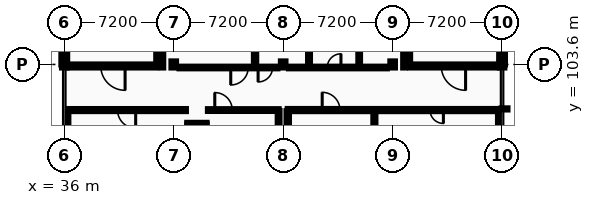
"""IFC4 building model, lengths in metres.
Left out: names, types, materials, properties, quantities, classifications, styles, units other than length and angle.
Written with IfcOpenShell. Run it as: python <this file> out.ifc"""

import sys

from ifc_helpers import new_model, si_unit, direction, frame, frame_2d, origin, origin_2d, place, context, subcontext, project, spatial, rectangle, i_section, extrude, element, fill, save


model = new_model("IFC4")
c1 = context("Model", 3, precision=1e-05, world=origin(), true_north=direction((0.0, 1.0)))
c2 = subcontext(c1, "Body", "Model", "MODEL_VIEW")
j1 = project(units=[si_unit("LENGTHUNIT", "METRE"), si_unit("PLANEANGLEUNIT", "RADIAN")], contexts=[c1])
p1 = place(None, origin())
s1 = spatial("IfcSite", under=j1, at=p1, CompositionType="ELEMENT")
p2 = place(p1, origin())
s2 = spatial("IfcBuilding", under=s1, at=p2, CompositionType="ELEMENT")
p3 = place(p2, frame((0.0, 0.0, 9.6)))
s3 = spatial("IfcBuildingStorey", under=s2, at=p3, CompositionType="ELEMENT", Elevation=9.6)
for number, where, z_axis, x_axis in (
    (1, (36.0, 103.6, 0.0), (0.0, 0.0, 1.0), (1.0, 0.0, 0.0)),
    (2, (43.2, 103.6, 0.0), (0.0, 0.0, 1.0), (1.0, 0.0, 0.0)),
    (3, (50.4, 103.6, 0.0), (0.0, 0.0, 1.0), (1.0, 0.0, 0.0)),
    (4, (57.6, 103.6, 0.0), (0.0, 0.0, 1.0), (1.0, 0.0, 0.0)),
    (5, (64.8, 103.6, 0.0), (0.0, 0.0, 1.0), (1.0, 0.0, 0.0)),
):
    element("IfcColumn", number, at=place(p3, frame(where, z_axis=z_axis, x_axis=x_axis)), inside=s3, PredefinedType="COLUMN", context=c2, shape_type="SweptSolid", body=[
        extrude(i_section(OverallWidth=0.3, OverallDepth=0.4, WebThickness=0.013, FlangeThickness=0.024, FilletRadius=0.027, at=origin_2d()), origin(), (0.0, 0.0, 1.0), 4.4),
    ])
p4 = place(p3, frame((36.0, 106.8, 0.0), z_axis=(0.0, 0.0, 1.0), x_axis=(0.0, -1.0, 0.0)))
e6 = element("IfcWall", 6, at=p4, inside=s3, PredefinedType="STANDARD", context=c2, shape_type="SweptSolid", body=[
    extrude(rectangle(XDim=3.2, YDim=0.38, at=frame_2d((1.6, 0.0))), origin(), (0.0, 0.0, 1.0), 4.2),
])
p5 = place(p4, frame((0.966, 0.0, 0.95)))
e7 = element("IfcOpeningElement", 7, at=p5, cuts=e6, PredefinedType="OPENING", context=c2, shape_type="SweptSolid", body=[
    extrude(rectangle(XDim=1.268, YDim=1.404, at=frame_2d((0.634, 0.702))), frame((0.0, 0.2, 0.0), z_axis=(0.0, -1.0, 0.0), x_axis=(1.0, 0.0, 0.0)), (0.0, 0.0, 1.0), 0.4),
])
p6 = place(p3, frame((64.8, 103.6, 0.0), z_axis=(0.0, 0.0, 1.0), x_axis=(0.0, 1.0, 0.0)))
e8 = element("IfcWall", 8, at=p6, inside=s3, PredefinedType="STANDARD", context=c2, shape_type="SweptSolid", body=[
    extrude(rectangle(XDim=3.2, YDim=0.38, at=frame_2d((1.6, 0.0))), origin(), (0.0, 0.0, 1.0), 4.2),
])
p7 = place(p6, frame((0.7, 0.0, 0.9)))
e9 = element("IfcOpeningElement", 9, at=p7, cuts=e8, PredefinedType="OPENING", context=c2, shape_type="SweptSolid", body=[
    extrude(rectangle(XDim=1.8, YDim=1.8, at=frame_2d((0.9, 0.9))), frame((0.0, 0.2, 0.0), z_axis=(0.0, -1.0, 0.0), x_axis=(1.0, 0.0, 0.0)), (0.0, 0.0, 1.0), 0.4),
])
p8 = place(p3, frame((36.35, 103.5, 0.0), z_axis=(0.0, 0.0, 1.0), x_axis=(1.0, 0.0, 0.0)))
e10 = element("IfcWall", 10, at=p8, inside=s3, PredefinedType="PARTITIONING", context=c2, shape_type="SweptSolid", body=[
    extrude(rectangle(XDim=5.7, YDim=0.2, at=frame_2d((2.85, 0.0))), origin(), (0.0, 0.0, 1.0), 3.895),
])
p9 = place(p8, frame((2.05, 0.0, 0.0)))
e11 = element("IfcOpeningElement", 11, at=p9, cuts=e10, PredefinedType="OPENING", context=c2, shape_type="SweptSolid", body=[
    extrude(rectangle(XDim=1.6, YDim=2.2, at=frame_2d((0.8, 1.1))), frame((0.0, 0.11, 0.0), z_axis=(0.0, -1.0, 0.0), x_axis=(1.0, 0.0, 0.0)), (0.0, 0.0, 1.0), 0.22),
])
p10 = place(p3, frame((42.15, 103.6, 0.0), z_axis=(0.0, 0.0, 1.0), x_axis=(0.0, 1.0, 0.0)))
e12 = element("IfcWall", 12, at=p10, inside=s3, PredefinedType="PARTITIONING", context=c2, shape_type="SweptSolid", body=[
    extrude(rectangle(XDim=3.2, YDim=0.2, at=frame_2d((1.6, 0.0))), origin(), (0.0, 0.0, 1.0), 4.2),
])
p11 = place(p3, frame((58.75, 103.5, 0.0), z_axis=(0.0, 0.0, 1.0), x_axis=(1.0, 0.0, 0.0)))
e13 = element("IfcWall", 13, at=p11, inside=s3, PredefinedType="PARTITIONING", context=c2, shape_type="SweptSolid", body=[
    extrude(rectangle(XDim=5.7, YDim=0.2, at=frame_2d((2.85, 0.0))), origin(), (0.0, 0.0, 1.0), 3.895),
])
p12 = place(p11, frame((2.05, 0.0, 0.0)))
e14 = element("IfcOpeningElement", 14, at=p12, cuts=e13, PredefinedType="OPENING", context=c2, shape_type="SweptSolid", body=[
    extrude(rectangle(XDim=1.6, YDim=2.2, at=frame_2d((0.8, 1.1))), frame((0.0, 0.11, 0.0), z_axis=(0.0, -1.0, 0.0), x_axis=(1.0, 0.0, 0.0)), (0.0, 0.0, 1.0), 0.22),
])
p13 = place(p3, frame((58.65, 103.6, 0.0), z_axis=(0.0, 0.0, 1.0), x_axis=(0.0, 1.0, 0.0)))
e15 = element("IfcWall", 15, at=p13, inside=s3, PredefinedType="PARTITIONING", context=c2, shape_type="SweptSolid", body=[
    extrude(rectangle(XDim=3.2, YDim=0.2, at=frame_2d((1.6, 0.0))), origin(), (0.0, 0.0, 1.0), 4.2),
])
p14 = place(p3, frame((44.09, 99.705, 0.0), z_axis=(0.0, 0.0, 1.0), x_axis=(1.0, 0.0, 0.0)))
e16 = element("IfcWall", 16, at=p14, inside=s3, PredefinedType="PARTITIONING", context=c2, shape_type="SweptSolid", body=[
    extrude(rectangle(XDim=1.27, YDim=0.11, at=frame_2d((0.635, 0.0))), origin(), (0.0, 0.0, 1.0), 4.2),
])
for number, where, z_axis, x_axis in (
    (17, (44.145, 98.6, 0.0), (0.0, 0.0, 1.0), (0.0, 1.0, 0.0)),
    (18, (45.305, 98.6, 0.0), (0.0, 0.0, 1.0), (0.0, 1.0, 0.0)),
):
    element("IfcWall", number, at=place(p3, frame(where, z_axis=z_axis, x_axis=x_axis)), inside=s3, PredefinedType="PARTITIONING", context=c2, shape_type="SweptSolid", body=[
        extrude(rectangle(XDim=1.05, YDim=0.11, at=frame_2d((0.525, 0.0))), origin(), (0.0, 0.0, 1.0), 4.2),
    ])
p15 = place(p3, frame((36.2, 100.6, 0.0), z_axis=(0.0, 0.0, 1.0), x_axis=(1.0, 0.0, 0.0)))
e19 = element("IfcWall", 19, at=p15, inside=s3, PredefinedType="PARTITIONING", context=c2, shape_type="SweptSolid", body=[
    extrude(rectangle(XDim=7.8, YDim=0.135, at=frame_2d((3.9, 0.0))), origin(), (0.0, 0.0, 1.0), 4.2),
])
p16 = place(p15, frame((3.304, 0.0, 0.0)))
e20 = element("IfcOpeningElement", 20, at=p16, cuts=e19, PredefinedType="OPENING", context=c2, shape_type="SweptSolid", body=[
    extrude(rectangle(XDim=1.192, YDim=2.152, at=frame_2d((0.596, 1.076))), frame((0.0, 0.078, 0.0), z_axis=(0.0, -1.0, 0.0), x_axis=(1.0, 0.0, 0.0)), (0.0, 0.0, 1.0), 0.155),
])
p17 = place(p3, frame((45.45, 100.6, 0.0), z_axis=(0.0, 0.0, 1.0), x_axis=(1.0, 0.0, 0.0)))
e21 = element("IfcWall", 21, at=p17, inside=s3, PredefinedType="PARTITIONING", context=c2, shape_type="SweptSolid", body=[
    extrude(rectangle(XDim=4.65, YDim=0.118, at=frame_2d((2.325, 0.0))), origin(), (0.0, 0.0, 1.0), 4.2),
])
p18 = place(p17, frame((0.45, 0.0, 0.0)))
e22 = element("IfcOpeningElement", 22, at=p18, cuts=e21, PredefinedType="OPENING", context=c2, shape_type="SweptSolid", body=[
    extrude(rectangle(XDim=1.15, YDim=2.15, at=frame_2d((0.575, 1.075))), frame((0.0, 0.069, 0.0), z_axis=(0.0, -1.0, 0.0), x_axis=(1.0, 0.0, 0.0)), (0.0, 0.0, 1.0), 0.138),
])
p19 = place(p3, frame((50.7, 100.6, 0.0), z_axis=(0.0, 0.0, 1.0), x_axis=(1.0, 0.0, 0.0)))
e23 = element("IfcWall", 23, at=p19, inside=s3, PredefinedType="PARTITIONING", context=c2, shape_type="SweptSolid", body=[
    extrude(rectangle(XDim=13.9, YDim=0.142, at=frame_2d((6.95, 0.0))), origin(), (0.0, 0.0, 1.0), 4.2),
])
p20 = place(p19, frame((2.267, 0.0, 0.0)))
e24 = element("IfcOpeningElement", 24, at=p20, cuts=e23, PredefinedType="OPENING", context=c2, shape_type="SweptSolid", body=[
    extrude(rectangle(XDim=1.166, YDim=2.152, at=frame_2d((0.583, 1.076))), frame((0.0, 0.081, 0.0), z_axis=(0.0, -1.0, 0.0), x_axis=(1.0, 0.0, 0.0)), (0.0, 0.0, 1.0), 0.162),
])
p21 = place(p19, frame((9.36, 0.0, 0.0)))
e25 = element("IfcOpeningElement", 25, at=p21, cuts=e23, PredefinedType="OPENING", context=c2, shape_type="SweptSolid", body=[
    extrude(rectangle(XDim=0.88, YDim=2.04, at=frame_2d((0.44, 1.02))), frame((0.0, 0.081, 0.0), z_axis=(0.0, -1.0, 0.0), x_axis=(1.0, 0.0, 0.0)), (0.0, 0.0, 1.0), 0.162),
])
p22 = place(p3, frame((43.58, 103.4, 0.0), z_axis=(0.0, 0.0, 1.0), x_axis=(1.0, 0.0, 0.0)))
e26 = element("IfcWall", 26, at=p22, inside=s3, PredefinedType="PARTITIONING", context=c2, shape_type="SweptSolid", body=[
    extrude(rectangle(XDim=6.44, YDim=0.11, at=frame_2d((3.22, 0.0))), origin(), (0.0, 0.0, 1.0), 3.895),
])
p23 = place(p22, frame((5.17, 0.0, 0.0)))
e27 = element("IfcOpeningElement", 27, at=p23, cuts=e26, PredefinedType="OPENING", context=c2, shape_type="SweptSolid", body=[
    extrude(rectangle(XDim=0.95, YDim=2.1, at=frame_2d((0.475, 1.05))), frame((0.0, 0.065, 0.0), z_axis=(0.0, -1.0, 0.0), x_axis=(1.0, 0.0, 0.0)), (0.0, 0.0, 1.0), 0.13),
])
p24 = place(p22, frame((3.37, 0.0, 0.0)))
e28 = element("IfcOpeningElement", 28, at=p24, cuts=e26, PredefinedType="OPENING", context=c2, shape_type="SweptSolid", body=[
    extrude(rectangle(XDim=1.15, YDim=2.15, at=frame_2d((0.575, 1.075))), frame((0.0, 0.065, 0.0), z_axis=(0.0, -1.0, 0.0), x_axis=(1.0, 0.0, 0.0)), (0.0, 0.0, 1.0), 0.13),
])
p25 = place(p3, frame((50.78, 103.4, 0.0), z_axis=(0.0, 0.0, 1.0), x_axis=(1.0, 0.0, 0.0)))
e29 = element("IfcWall", 29, at=p25, inside=s3, PredefinedType="PARTITIONING", context=c2, shape_type="SweptSolid", body=[
    extrude(rectangle(XDim=6.44, YDim=0.11, at=frame_2d((3.22, 0.0))), origin(), (0.0, 0.0, 1.0), 3.895),
])
p26 = place(p25, frame((5.03, 0.0, 0.0)))
e30 = element("IfcOpeningElement", 30, at=p26, cuts=e29, PredefinedType="OPENING", context=c2, shape_type="SweptSolid", body=[
    extrude(rectangle(XDim=1.0, YDim=2.1, at=frame_2d((0.5, 1.05))), frame((0.0, 0.065, 0.0), z_axis=(0.0, -1.0, 0.0), x_axis=(1.0, 0.0, 0.0)), (0.0, 0.0, 1.0), 0.13),
])
p27 = place(p25, frame((2.52, 0.0, 0.0)))
e31 = element("IfcOpeningElement", 31, at=p27, cuts=e29, PredefinedType="OPENING", context=c2, shape_type="SweptSolid", body=[
    extrude(rectangle(XDim=0.9, YDim=2.1, at=frame_2d((0.45, 1.05))), frame((0.0, 0.065, 0.0), z_axis=(0.0, -1.0, 0.0), x_axis=(1.0, 0.0, 0.0)), (0.0, 0.0, 1.0), 0.13),
])
p28 = place(p3, frame((36.2, 96.78, 0.0), z_axis=(0.0, 0.0, 1.0), x_axis=(0.0, 1.0, 0.0)))
e32 = element("IfcWall", 32, at=p28, inside=s3, PredefinedType="PARTITIONING", context=c2, shape_type="SweptSolid", body=[
    extrude(rectangle(XDim=3.752, YDim=0.135, at=frame_2d((1.876, 0.0))), origin(), (0.0, 0.0, 1.0), 3.885),
])
p29 = place(p3, frame((42.45, 103.4, 0.0), z_axis=(0.0, 0.0, 1.0), x_axis=(0.0, 1.0, 0.0)))
e33 = element("IfcWall", 33, at=p29, inside=s3, PredefinedType="PARTITIONING", context=c2, shape_type="SweptSolid", body=[
    extrude(rectangle(XDim=3.225, YDim=0.118, at=frame_2d((1.613, 0.0))), origin(), (0.0, 0.0, 1.0), 4.2),
])
p30 = place(p3, frame((48.55, 103.455, 0.0), z_axis=(0.0, 0.0, 1.0), x_axis=(0.0, 1.0, 0.0)))
e34 = element("IfcWall", 34, at=p30, inside=s3, PredefinedType="PARTITIONING", context=c2, shape_type="SweptSolid", body=[
    extrude(rectangle(XDim=14.345, YDim=0.15, at=frame_2d((7.172, 0.0))), origin(), (0.0, 0.0, 1.0), 4.2),
])
p31 = place(p3, frame((50.1, 96.78, 0.0), z_axis=(0.0, 0.0, 1.0), x_axis=(0.0, 1.0, 0.0)))
e35 = element("IfcWall", 35, at=p31, inside=s3, PredefinedType="PARTITIONING", context=c2, shape_type="SweptSolid", body=[
    extrude(rectangle(XDim=3.761, YDim=0.118, at=frame_2d((1.88, 0.0))), origin(), (0.0, 0.0, 1.0), 4.2),
])
p32 = place(p3, frame((50.7, 96.78, 0.0), z_axis=(0.0, 0.0, 1.0), x_axis=(0.0, 1.0, 0.0)))
e36 = element("IfcWall", 36, at=p32, inside=s3, PredefinedType="PARTITIONING", context=c2, shape_type="SweptSolid", body=[
    extrude(rectangle(XDim=3.749, YDim=0.16, at=frame_2d((1.875, 0.0))), origin(), (0.0, 0.0, 1.0), 3.895),
])
p33 = place(p3, frame((52.1, 103.455, 0.0), z_axis=(0.0, 0.0, 1.0), x_axis=(0.0, 1.0, 0.0)))
e37 = element("IfcWall", 37, at=p33, inside=s3, PredefinedType="PARTITIONING", context=c2, shape_type="SweptSolid", body=[
    extrude(rectangle(XDim=14.345, YDim=0.125, at=frame_2d((7.172, 0.0))), origin(), (0.0, 0.0, 1.0), 4.2),
])
p34 = place(p3, frame((55.4, 103.455, 0.0), z_axis=(0.0, 0.0, 1.0), x_axis=(0.0, 1.0, 0.0)))
e38 = element("IfcWall", 38, at=p34, inside=s3, PredefinedType="PARTITIONING", context=c2, shape_type="SweptSolid", body=[
    extrude(rectangle(XDim=14.345, YDim=0.11, at=frame_2d((7.172, 0.0))), origin(), (0.0, 0.0, 1.0), 3.915),
])
p35 = place(p3, frame((56.4, 82.271, 0.0), z_axis=(0.0, 0.0, 1.0), x_axis=(0.0, 1.0, 0.0)))
e39 = element("IfcWall", 39, at=p35, inside=s3, PredefinedType="PARTITIONING", context=c2, shape_type="SweptSolid", body=[
    extrude(rectangle(XDim=18.258, YDim=0.135, at=frame_2d((9.129, 0.0))), origin(), (0.0, 0.0, 1.0), 4.2),
])
p36 = place(p3, frame((58.35, 103.4, 0.0), z_axis=(0.0, 0.0, 1.0), x_axis=(0.0, 1.0, 0.0)))
e40 = element("IfcWall", 40, at=p36, inside=s3, PredefinedType="PARTITIONING", context=c2, shape_type="SweptSolid", body=[
    extrude(rectangle(XDim=3.225, YDim=0.11, at=frame_2d((1.613, 0.0))), origin(), (0.0, 0.0, 1.0), 4.2),
])
p37 = place(p3, frame((64.6, 96.78, 0.0), z_axis=(0.0, 0.0, 1.0), x_axis=(0.0, 1.0, 0.0)))
e41 = element("IfcWall", 41, at=p37, inside=s3, PredefinedType="PARTITIONING", context=c2, shape_type="SweptSolid", body=[
    extrude(rectangle(XDim=3.749, YDim=0.135, at=frame_2d((1.875, 0.0))), origin(), (0.0, 0.0, 1.0), 3.885),
])
p38 = place(p7, origin())
e42 = element("IfcWindow", 42, at=p38, inside=s3, PartitioningType="SINGLE_PANEL", PredefinedType="WINDOW", context=c2, shape_type="SweptSolid", body=[
    extrude(rectangle(XDim=1.8, YDim=1.8, at=frame_2d((0.9, 0.9))), frame((0.0, 0.03, 0.0), z_axis=(0.0, -1.0, 0.0), x_axis=(1.0, 0.0, 0.0)), (0.0, 0.0, 1.0), 0.06),
])
fill(e9, e42)
p39 = place(p9, origin())
e43 = element("IfcDoor", 43, at=p39, inside=s3, OperationType="DOUBLE_DOOR_SINGLE_SWING", PredefinedType="DOOR", context=c2, shape_type="SweptSolid", body=[
    extrude(rectangle(XDim=1.6, YDim=2.2, at=frame_2d((0.8, 1.1))), frame((0.0, 0.025, 0.0), z_axis=(0.0, -1.0, 0.0), x_axis=(1.0, 0.0, 0.0)), (0.0, 0.0, 1.0), 0.05),
])
fill(e11, e43)
p40 = place(p12, origin())
e44 = element("IfcDoor", 44, at=p40, inside=s3, OperationType="DOUBLE_DOOR_SINGLE_SWING", PredefinedType="DOOR", context=c2, shape_type="SweptSolid", body=[
    extrude(rectangle(XDim=1.6, YDim=2.2, at=frame_2d((0.8, 1.1))), frame((0.0, 0.025, 0.0), z_axis=(0.0, -1.0, 0.0), x_axis=(1.0, 0.0, 0.0)), (0.0, 0.0, 1.0), 0.05),
])
fill(e14, e44)
p41 = place(p26, frame((1.0, 0.0, 0.0), z_axis=(0.0, 0.0, 1.0), x_axis=(-1.0, 0.0, 0.0)))
e45 = element("IfcDoor", 45, at=p41, inside=s3, OperationType="SLIDING_TO_LEFT", PredefinedType="DOOR", context=c2, shape_type="SweptSolid", body=[
    extrude(rectangle(XDim=1.0, YDim=2.1, at=frame_2d((0.5, 1.05))), frame((0.0, 0.025, 0.0), z_axis=(0.0, -1.0, 0.0), x_axis=(1.0, 0.0, 0.0)), (0.0, 0.0, 1.0), 0.05),
])
fill(e30, e45)
p42 = place(p27, frame((0.9, 0.0, 0.0), z_axis=(0.0, 0.0, 1.0), x_axis=(-1.0, 0.0, 0.0)))
e46 = element("IfcDoor", 46, at=p42, inside=s3, OperationType="SINGLE_SWING_RIGHT", PredefinedType="DOOR", context=c2, shape_type="SweptSolid", body=[
    extrude(rectangle(XDim=0.9, YDim=2.1, at=frame_2d((0.45, 1.05))), frame((0.0, 0.025, 0.0), z_axis=(0.0, -1.0, 0.0), x_axis=(1.0, 0.0, 0.0)), (0.0, 0.0, 1.0), 0.05),
])
fill(e31, e46)
p43 = place(p23, frame((0.95, 0.0, 0.0), z_axis=(0.0, 0.0, 1.0), x_axis=(-1.0, 0.0, 0.0)))
e47 = element("IfcDoor", 47, at=p43, inside=s3, OperationType="SINGLE_SWING_LEFT", PredefinedType="DOOR", context=c2, shape_type="SweptSolid", body=[
    extrude(rectangle(XDim=0.95, YDim=2.1, at=frame_2d((0.475, 1.05))), frame((0.0, 0.025, 0.0), z_axis=(0.0, -1.0, 0.0), x_axis=(1.0, 0.0, 0.0)), (0.0, 0.0, 1.0), 0.05),
])
fill(e27, e47)
p44 = place(p18, origin())
e48 = element("IfcDoor", 48, at=p44, inside=s3, OperationType="SINGLE_SWING_LEFT", PredefinedType="DOOR", context=c2, shape_type="SweptSolid", body=[
    extrude(rectangle(XDim=1.15, YDim=2.15, at=frame_2d((0.575, 1.075))), frame((0.0, 0.025, 0.0), z_axis=(0.0, -1.0, 0.0), x_axis=(1.0, 0.0, 0.0)), (0.0, 0.0, 1.0), 0.05),
])
fill(e22, e48)
p45 = place(p24, frame((1.15, 0.0, 0.0), z_axis=(0.0, 0.0, 1.0), x_axis=(-1.0, 0.0, 0.0)))
e49 = element("IfcDoor", 49, at=p45, inside=s3, OperationType="SINGLE_SWING_LEFT", PredefinedType="DOOR", context=c2, shape_type="SweptSolid", body=[
    extrude(rectangle(XDim=1.15, YDim=2.15, at=frame_2d((0.575, 1.075))), frame((0.0, 0.025, 0.0), z_axis=(0.0, -1.0, 0.0), x_axis=(1.0, 0.0, 0.0)), (0.0, 0.0, 1.0), 0.05),
])
fill(e28, e49)
p46 = place(p20, origin())
e50 = element("IfcDoor", 50, at=p46, inside=s3, OperationType="SINGLE_SWING_LEFT", PredefinedType="DOOR", context=c2, shape_type="SweptSolid", body=[
    extrude(rectangle(XDim=1.166, YDim=2.152, at=frame_2d((0.583, 1.076))), frame((0.0, 0.025, 0.0), z_axis=(0.0, -1.0, 0.0), x_axis=(1.0, 0.0, 0.0)), (0.0, 0.0, 1.0), 0.05),
])
fill(e24, e50)
p47 = place(p16, origin())
e51 = element("IfcDoor", 51, at=p47, inside=s3, OperationType="SINGLE_SWING_RIGHT", PredefinedType="DOOR", context=c2, shape_type="SweptSolid", body=[
    extrude(rectangle(XDim=1.192, YDim=2.152, at=frame_2d((0.596, 1.076))), frame((0.0, 0.025, 0.0), z_axis=(0.0, -1.0, 0.0), x_axis=(1.0, 0.0, 0.0)), (0.0, 0.0, 1.0), 0.05),
])
fill(e20, e51)
p48 = place(p21, origin())
e52 = element("IfcDoor", 52, at=p48, inside=s3, OperationType="SINGLE_SWING_RIGHT", PredefinedType="DOOR", context=c2, shape_type="SweptSolid", body=[
    extrude(rectangle(XDim=0.88, YDim=2.04, at=frame_2d((0.44, 1.02))), frame((0.0, 0.025, 0.0), z_axis=(0.0, -1.0, 0.0), x_axis=(1.0, 0.0, 0.0)), (0.0, 0.0, 1.0), 0.05),
])
fill(e25, e52)
save(model, sys.argv[1])
